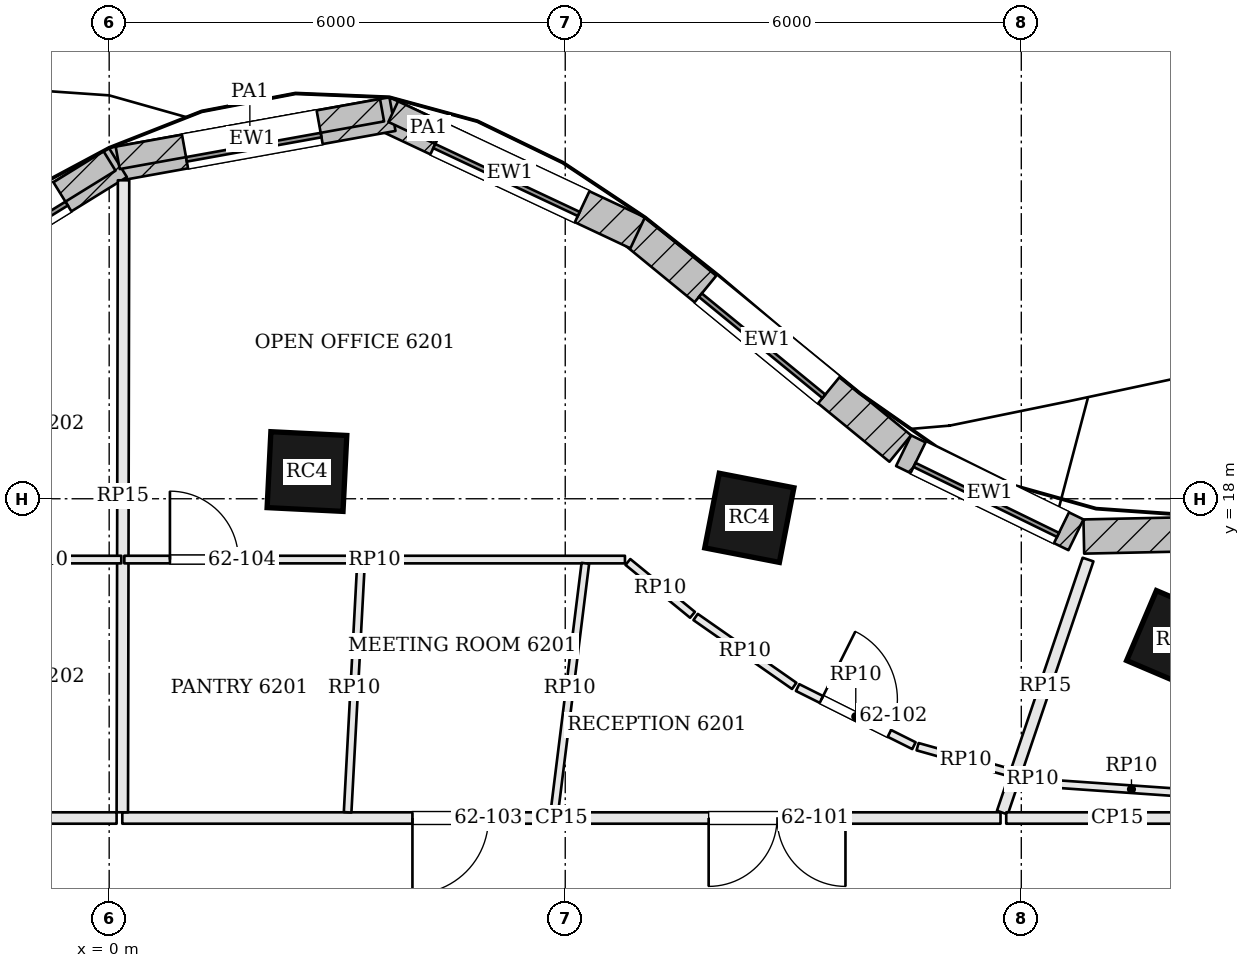
"""IFC4 building model, lengths in metres.
Left out: names, types, materials, properties, quantities, classifications, styles, units other than length and angle.
Written with IfcOpenShell. Run it as: python <this file> out.ifc"""

import sys

from ifc_helpers import new_model, si_unit, direction, frame, frame_2d, origin, origin_2d, place, context, subcontext, project, spatial, rectangle, extrude, element, fill, save


model = new_model("IFC4")
c1 = context("Model", 3, precision=1e-05, world=origin(), true_north=direction((0.0, 1.0)))
c2 = subcontext(c1, "Body", "Model", "MODEL_VIEW")
j1 = project(units=[si_unit("LENGTHUNIT", "METRE"), si_unit("PLANEANGLEUNIT", "RADIAN")], contexts=[c1])
p1 = place(None, origin())
s1 = spatial("IfcSite", under=j1, at=p1, CompositionType="ELEMENT")
p2 = place(p1, origin())
s2 = spatial("IfcBuilding", under=s1, at=p2, CompositionType="ELEMENT")
p3 = place(p2, frame((0.0, 0.0, 252.6)))
s3 = spatial("IfcBuildingStorey", under=s2, at=p3, CompositionType="ELEMENT", Elevation=252.6)
for number, where, z_axis, x_axis in (
    (1, (14.042, 16.136, 0.0), (0.0, 0.0, 1.0), (-0.92, 0.392, 0.0)),
    (2, (8.422, 17.749, 0.0), (0.0, 0.0, 1.0), (-0.982, 0.191, 0.0)),
    (3, (2.602, 18.358, 0.0), (0.0, 0.0, 1.0), (-0.999, 0.05, 0.0)),
):
    element("IfcColumn", number, at=place(p3, frame(where, z_axis=z_axis, x_axis=x_axis)), inside=s3, PredefinedType="COLUMN", context=c2, shape_type="SweptSolid", body=[
        extrude(rectangle(XDim=1.0, YDim=1.0, at=origin_2d()), origin(), (0.0, 0.0, 1.0), 3.9),
    ])
p4 = place(p3, frame((18.434, 17.622, 0.0), z_axis=(0.0, 0.0, 1.0), x_axis=(-0.999773749739, -0.021270856405, 0.0)))
e4 = element("IfcWall", 4, at=p4, inside=s3, PredefinedType="SOLIDWALL", context=c2, shape_type="SweptSolid", body=[
    extrude(rectangle(XDim=5.613, YDim=0.45, at=frame_2d((2.806, 0.0))), origin(), (0.0, 0.0, 1.0), 3.7),
])
p5 = place(p4, frame((1.756, 0.0, 0.9)))
e5 = element("IfcOpeningElement", 5, at=p5, cuts=e4, PredefinedType="OPENING", context=c2, shape_type="SweptSolid", body=[
    extrude(rectangle(XDim=2.1, YDim=2.3, at=frame_2d((1.05, 1.15))), frame((0.0, 0.235, 0.0), z_axis=(0.0, -1.0, 0.0), x_axis=(1.0, 0.0, 0.0)), (0.0, 0.0, 1.0), 0.47),
])
p6 = place(p3, frame((12.719, 17.526, 0.0), z_axis=(0.0, 0.0, 1.0), x_axis=(-0.898643806462, 0.438679050226, 0.0)))
e6 = element("IfcWall", 6, at=p6, inside=s3, PredefinedType="SOLIDWALL", context=c2, shape_type="SweptSolid", body=[
    extrude(rectangle(XDim=2.523, YDim=0.45, at=frame_2d((1.262, 0.0))), origin(), (0.0, 0.0, 1.0), 3.7),
])
p7 = place(p6, frame((0.212, 0.0, 0.9)))
e7 = element("IfcOpeningElement", 7, at=p7, cuts=e6, PredefinedType="OPENING", context=c2, shape_type="SweptSolid", body=[
    extrude(rectangle(XDim=2.1, YDim=2.3, at=frame_2d((1.05, 1.15))), frame((0.0, 0.235, 0.0), z_axis=(0.0, -1.0, 0.0), x_axis=(1.0, 0.0, 0.0)), (0.0, 0.0, 1.0), 0.47),
])
p8 = place(p3, frame((10.407, 18.661, 0.0), z_axis=(0.0, 0.0, 1.0), x_axis=(-0.773702458947, 0.633549133864, 0.0)))
e8 = element("IfcWall", 8, at=p8, inside=s3, PredefinedType="SOLIDWALL", context=c2, shape_type="SweptSolid", body=[
    extrude(rectangle(XDim=4.526, YDim=0.45, at=frame_2d((2.263, 0.0))), origin(), (0.0, 0.0, 1.0), 3.7),
])
p9 = place(p8, frame((1.213, 0.0, 0.9)))
e9 = element("IfcOpeningElement", 9, at=p9, cuts=e8, PredefinedType="OPENING", context=c2, shape_type="SweptSolid", body=[
    extrude(rectangle(XDim=2.1, YDim=2.3, at=frame_2d((1.05, 1.15))), frame((0.0, 0.235, 0.0), z_axis=(0.0, -1.0, 0.0), x_axis=(1.0, 0.0, 0.0)), (0.0, 0.0, 1.0), 0.47),
])
p10 = place(p3, frame((6.953, 21.499, 0.0), z_axis=(0.0, 0.0, 1.0), x_axis=(-0.905034581957, 0.425337989676, 0.0)))
e10 = element("IfcWall", 10, at=p10, inside=s3, PredefinedType="SOLIDWALL", context=c2, shape_type="SweptSolid", body=[
    extrude(rectangle(XDim=3.714, YDim=0.45, at=frame_2d((1.857, 0.0))), origin(), (0.0, 0.0, 1.0), 3.7),
])
p11 = place(p10, frame((0.807, 0.0, 0.9)))
e11 = element("IfcOpeningElement", 11, at=p11, cuts=e10, PredefinedType="OPENING", context=c2, shape_type="SweptSolid", body=[
    extrude(rectangle(XDim=2.1, YDim=2.3, at=frame_2d((1.05, 1.15))), frame((0.0, 0.235, 0.0), z_axis=(0.0, -1.0, 0.0), x_axis=(1.0, 0.0, 0.0)), (0.0, 0.0, 1.0), 0.47),
])
p12 = place(p3, frame((3.727, 23.061, 0.0), z_axis=(0.0, 0.0, 1.0), x_axis=(-0.984119180424, -0.177508982087, 0.0)))
e12 = element("IfcWall", 12, at=p12, inside=s3, PredefinedType="SOLIDWALL", context=c2, shape_type="SweptSolid", body=[
    extrude(rectangle(XDim=3.747, YDim=0.45, at=frame_2d((1.873, 0.0))), origin(), (0.0, 0.0, 1.0), 3.7),
])
p13 = place(p12, frame((0.973, 0.0, 0.9)))
e13 = element("IfcOpeningElement", 13, at=p13, cuts=e12, PredefinedType="OPENING", context=c2, shape_type="SweptSolid", body=[
    extrude(rectangle(XDim=1.8, YDim=2.3, at=frame_2d((0.9, 1.15))), frame((0.0, 0.235, 0.0), z_axis=(0.0, -1.0, 0.0), x_axis=(1.0, 0.0, 0.0)), (0.0, 0.0, 1.0), 0.47),
])
p14 = place(p3, frame((0.115, 22.424, 0.0), z_axis=(0.0, 0.0, 1.0), x_axis=(-0.8506970368, -0.525656305564, 0.0)))
e14 = element("IfcWall", 14, at=p14, inside=s3, PredefinedType="SOLIDWALL", context=c2, shape_type="SweptSolid", body=[
    extrude(rectangle(XDim=3.816, YDim=0.45, at=frame_2d((1.908, 0.0))), origin(), (0.0, 0.0, 1.0), 3.7),
])
p15 = place(p14, frame((0.858, 0.0, 0.9)))
e15 = element("IfcOpeningElement", 15, at=p15, cuts=e14, PredefinedType="OPENING", context=c2, shape_type="SweptSolid", body=[
    extrude(rectangle(XDim=2.1, YDim=2.3, at=frame_2d((1.05, 1.15))), frame((0.0, 0.235, 0.0), z_axis=(0.0, -1.0, 0.0), x_axis=(1.0, 0.0, 0.0)), (0.0, 0.0, 1.0), 0.47),
])
p16 = place(p3, frame((4.667, 22.656, 3.9), z_axis=(0.0, 0.0, 1.0), x_axis=(-0.905050240273, 0.425304670304, 0.0)))
e16 = element("IfcWall", 16, at=p16, inside=s3, PredefinedType="PARAPET", context=c2, shape_type="SweptSolid", body=[
    extrude(rectangle(XDim=1.027, YDim=0.3, at=frame_2d((0.513, 0.0))), origin(), (0.0, 0.0, 1.0), 1.1),
])
p17 = place(p3, frame((3.59, 23.112, 3.9), z_axis=(0.0, 0.0, 1.0), x_axis=(-0.984124248147, -0.177480884064, 0.0)))
e17 = element("IfcWall", 17, at=p17, inside=s3, PredefinedType="PARAPET", context=c2, shape_type="SweptSolid", body=[
    extrude(rectangle(XDim=3.534, YDim=0.3, at=frame_2d((1.767, 0.0))), origin(), (0.0, 0.0, 1.0), 1.1),
])
p18 = place(p3, frame((0.005, 22.444, 3.9), z_axis=(0.0, 0.0, 1.0), x_axis=(-0.850710394144, -0.525634688063, 0.0)))
e18 = element("IfcWall", 18, at=p18, inside=s3, PredefinedType="PARAPET", context=c2, shape_type="SweptSolid", body=[
    extrude(rectangle(XDim=3.702, YDim=0.3, at=frame_2d((1.851, 0.0))), origin(), (0.0, 0.0, 1.0), 1.1),
])
p19 = place(p3, frame((11.727, 13.8, 0.0), z_axis=(0.0, 0.0, 1.0), x_axis=(-1.0, 0.0, 0.0)))
e19 = element("IfcWall", 19, at=p19, inside=s3, PredefinedType="PARTITIONING", context=c2, shape_type="SweptSolid", body=[
    extrude(rectangle(XDim=11.554, YDim=0.15, at=frame_2d((5.777, 0.0))), origin(), (0.0, 0.0, 1.0), 3.084),
])
p20 = place(p19, frame((2.04, 0.0, 0.0)))
e20 = element("IfcOpeningElement", 20, at=p20, cuts=e19, PredefinedType="OPENING", context=c2, shape_type="SweptSolid", body=[
    extrude(rectangle(XDim=1.8, YDim=2.1, at=frame_2d((0.9, 1.05))), frame((0.0, 0.085, 0.0), z_axis=(0.0, -1.0, 0.0), x_axis=(1.0, 0.0, 0.0)), (0.0, 0.0, 1.0), 0.17),
])
p21 = place(p19, frame((6.737, 0.0, 0.0)))
e21 = element("IfcOpeningElement", 21, at=p21, cuts=e19, PredefinedType="OPENING", context=c2, shape_type="SweptSolid", body=[
    extrude(rectangle(XDim=1.0, YDim=2.4, at=frame_2d((0.5, 1.2))), frame((0.0, 0.085, 0.0), z_axis=(0.0, -1.0, 0.0), x_axis=(1.0, 0.0, 0.0)), (0.0, 0.0, 1.0), 0.17),
])
p22 = place(p3, frame((12.878, 17.2, 0.0), z_axis=(0.0, 0.0, 1.0), x_axis=(-0.320642197559, -0.947200391229, 0.0)))
e22 = element("IfcWall", 22, at=p22, inside=s3, PredefinedType="PARTITIONING", context=c2, shape_type="SweptSolid", body=[
    extrude(rectangle(XDim=3.515, YDim=0.15, at=frame_2d((1.757, 0.0))), origin(), (0.0, 0.0, 1.0), 3.084),
])
p23 = place(p3, frame((0.189, 22.19, 0.0), z_axis=(0.0, 0.0, 1.0), x_axis=(-0.001967286324, -0.99999806489, 0.0)))
e23 = element("IfcWall", 23, at=p23, inside=s3, PredefinedType="PARTITIONING", context=c2, shape_type="SweptSolid", body=[
    extrude(rectangle(XDim=8.315, YDim=0.15, at=frame_2d((4.157, 0.0))), origin(), (0.0, 0.0, 1.0), 3.084),
])
p24 = place(p3, frame((0.098, 13.8, 0.0), z_axis=(0.0, 0.0, 1.0), x_axis=(-1.0, 0.0, 0.0)))
e24 = element("IfcWall", 24, at=p24, inside=s3, PredefinedType="PARTITIONING", context=c2, shape_type="SweptSolid", body=[
    extrude(rectangle(XDim=12.609, YDim=0.15, at=frame_2d((6.304, 0.0))), origin(), (0.0, 0.0, 1.0), 3.084),
])
p25 = place(p24, frame((3.548, 0.0, 0.0)))
e25 = element("IfcOpeningElement", 25, at=p25, cuts=e24, PredefinedType="OPENING", context=c2, shape_type="SweptSolid", body=[
    extrude(rectangle(XDim=1.8, YDim=2.1, at=frame_2d((0.9, 1.05))), frame((0.0, 0.085, 0.0), z_axis=(0.0, -1.0, 0.0), x_axis=(1.0, 0.0, 0.0)), (0.0, 0.0, 1.0), 0.17),
])
p26 = place(p3, frame((14.725, 13.8, 0.0), z_axis=(0.0, 0.0, 1.0), x_axis=(-1.0, 0.0, 0.0)))
e26 = element("IfcWall", 26, at=p26, inside=s3, PredefinedType="PARTITIONING", context=c2, shape_type="SweptSolid", body=[
    extrude(rectangle(XDim=2.923, YDim=0.15, at=frame_2d((1.462, 0.0))), origin(), (0.0, 0.0, 1.0), 3.084),
])
p27 = place(p3, frame((0.199, 17.2, 0.0), z_axis=(0.0, 0.0, 1.0), x_axis=(1.0, 0.0, 0.0)))
e27 = element("IfcWall", 27, at=p27, inside=s3, PredefinedType="PARTITIONING", context=c2, shape_type="SweptSolid", body=[
    extrude(rectangle(XDim=6.586, YDim=0.1, at=frame_2d((3.293, 0.0))), origin(), (0.0, 0.0, 1.0), 3.084),
])
p28 = place(p27, frame((0.6, 0.0, 0.0)))
e28 = element("IfcOpeningElement", 28, at=p28, cuts=e27, PredefinedType="OPENING", context=c2, shape_type="SweptSolid", body=[
    extrude(rectangle(XDim=0.9, YDim=2.1, at=frame_2d((0.45, 1.05))), frame((0.0, 0.06, 0.0), z_axis=(0.0, -1.0, 0.0), x_axis=(1.0, 0.0, 0.0)), (0.0, 0.0, 1.0), 0.12),
])
p29 = place(p3, frame((6.824, 17.168, 0.0), z_axis=(0.0, 0.0, 1.0), x_axis=(0.774165282359, -0.632983503411, 0.0)))
e29 = element("IfcWall", 29, at=p29, inside=s3, PredefinedType="PARTITIONING", context=c2, shape_type="SweptSolid", body=[
    extrude(rectangle(XDim=1.098, YDim=0.1, at=frame_2d((0.549, 0.0))), origin(), (0.0, 0.0, 1.0), 3.084),
])
p30 = place(p3, frame((7.715, 16.445, 0.0), z_axis=(0.0, 0.0, 1.0), x_axis=(0.819746237961, -0.572726902938, 0.0)))
e30 = element("IfcWall", 30, at=p30, inside=s3, PredefinedType="PARTITIONING", context=c2, shape_type="SweptSolid", body=[
    extrude(rectangle(XDim=1.582, YDim=0.1, at=frame_2d((0.791, 0.0))), origin(), (0.0, 0.0, 1.0), 3.084),
])
p31 = place(p3, frame((9.057, 15.516, 0.0), z_axis=(0.0, 0.0, 1.0), x_axis=(0.894598395044, -0.446871023434, 0.0)))
e31 = element("IfcWall", 31, at=p31, inside=s3, PredefinedType="PARTITIONING", context=c2, shape_type="SweptSolid", body=[
    extrude(rectangle(XDim=1.71, YDim=0.1, at=frame_2d((0.855, 0.0))), origin(), (0.0, 0.0, 1.0), 3.084),
])
p32 = place(p31, frame((0.35, 0.0, 0.0)))
e32 = element("IfcOpeningElement", 32, at=p32, cuts=e31, PredefinedType="OPENING", context=c2, shape_type="SweptSolid", body=[
    extrude(rectangle(XDim=1.0, YDim=2.1, at=frame_2d((0.5, 1.05))), frame((0.0, 0.06, 0.0), z_axis=(0.0, -1.0, 0.0), x_axis=(1.0, 0.0, 0.0)), (0.0, 0.0, 1.0), 0.12),
])
p33 = place(p3, frame((10.635, 14.738, 0.0), z_axis=(0.0, 0.0, 1.0), x_axis=(0.962794316294, -0.270235276217, 0.0)))
e33 = element("IfcWall", 33, at=p33, inside=s3, PredefinedType="PARTITIONING", context=c2, shape_type="SweptSolid", body=[
    extrude(rectangle(XDim=1.316, YDim=0.1, at=frame_2d((0.658, 0.0))), origin(), (0.0, 0.0, 1.0), 3.084),
])
p34 = place(p3, frame((5.857, 13.875, 0.0), z_axis=(0.0, 0.0, 1.0), x_axis=(0.123579610883, 0.992334661177, 0.0)))
e34 = element("IfcWall", 34, at=p34, inside=s3, PredefinedType="PARTITIONING", context=c2, shape_type="SweptSolid", body=[
    extrude(rectangle(XDim=3.301, YDim=0.1, at=frame_2d((1.651, 0.0))), origin(), (0.0, 0.0, 1.0), 3.084),
])
p35 = place(p3, frame((3.137, 13.875, 0.0), z_axis=(0.0, 0.0, 1.0), x_axis=(0.053594127278, 0.998562801992, 0.0)))
e35 = element("IfcWall", 35, at=p35, inside=s3, PredefinedType="PARTITIONING", context=c2, shape_type="SweptSolid", body=[
    extrude(rectangle(XDim=3.28, YDim=0.1, at=frame_2d((1.64, 0.0))), origin(), (0.0, 0.0, 1.0), 3.084),
])
p36 = place(p3, frame((-1.93, 17.2, 0.0), z_axis=(0.0, 0.0, 1.0), x_axis=(1.0, 0.0, 0.0)))
e36 = element("IfcWall", 36, at=p36, inside=s3, PredefinedType="PARTITIONING", context=c2, shape_type="SweptSolid", body=[
    extrude(rectangle(XDim=2.09, YDim=0.1, at=frame_2d((1.045, 0.0))), origin(), (0.0, 0.0, 1.0), 3.084),
])
p37 = place(p3, frame((11.941, 14.372, 0.0), z_axis=(0.0, 0.0, 1.0), x_axis=(0.962770354452, -0.270320632932, 0.0)))
e37 = element("IfcWall", 37, at=p37, inside=s3, PredefinedType="PARTITIONING", context=c2, shape_type="SweptSolid", body=[
    extrude(rectangle(XDim=0.433, YDim=0.1, at=frame_2d((0.216, 0.0))), origin(), (0.0, 0.0, 1.0), 3.084),
])
p38 = place(p3, frame((12.408, 14.251, 0.0), z_axis=(0.0, 0.0, 1.0), x_axis=(0.997594502721, -0.069319608638, 0.0)))
e38 = element("IfcWall", 38, at=p38, inside=s3, PredefinedType="PARTITIONING", context=c2, shape_type="SweptSolid", body=[
    extrude(rectangle(XDim=2.089, YDim=0.1, at=frame_2d((1.044, 0.0))), origin(), (0.0, 0.0, 1.0), 3.084),
])
p39 = place(p7, origin())
e39 = element("IfcWindow", 39, at=p39, inside=s3, PartitioningType="SINGLE_PANEL", PredefinedType="WINDOW", context=c2, shape_type="SweptSolid", body=[
    extrude(rectangle(XDim=2.1, YDim=2.3, at=frame_2d((1.05, 1.15))), frame((0.0, 0.135, 0.0), z_axis=(0.0, -1.0, 0.0), x_axis=(1.0, 0.0, 0.0)), (0.0, 0.0, 1.0), 0.06),
])
fill(e7, e39)
p40 = place(p9, origin())
e40 = element("IfcWindow", 40, at=p40, inside=s3, PartitioningType="SINGLE_PANEL", PredefinedType="WINDOW", context=c2, shape_type="SweptSolid", body=[
    extrude(rectangle(XDim=2.1, YDim=2.3, at=frame_2d((1.05, 1.15))), frame((0.0, 0.135, 0.0), z_axis=(0.0, -1.0, 0.0), x_axis=(1.0, 0.0, 0.0)), (0.0, 0.0, 1.0), 0.06),
])
fill(e9, e40)
p41 = place(p11, origin())
e41 = element("IfcWindow", 41, at=p41, inside=s3, PartitioningType="SINGLE_PANEL", PredefinedType="WINDOW", context=c2, shape_type="SweptSolid", body=[
    extrude(rectangle(XDim=2.1, YDim=2.3, at=frame_2d((1.05, 1.15))), frame((0.0, 0.135, 0.0), z_axis=(0.0, -1.0, 0.0), x_axis=(1.0, 0.0, 0.0)), (0.0, 0.0, 1.0), 0.06),
])
fill(e11, e41)
p42 = place(p13, origin())
e42 = element("IfcWindow", 42, at=p42, inside=s3, PartitioningType="SINGLE_PANEL", PredefinedType="WINDOW", context=c2, shape_type="SweptSolid", body=[
    extrude(rectangle(XDim=1.8, YDim=2.3, at=frame_2d((0.9, 1.15))), frame((0.0, 0.135, 0.0), z_axis=(0.0, -1.0, 0.0), x_axis=(1.0, 0.0, 0.0)), (0.0, 0.0, 1.0), 0.06),
])
fill(e13, e42)
p43 = place(p15, origin())
e43 = element("IfcWindow", 43, at=p43, inside=s3, PartitioningType="SINGLE_PANEL", PredefinedType="WINDOW", context=c2, shape_type="SweptSolid", body=[
    extrude(rectangle(XDim=2.1, YDim=2.3, at=frame_2d((1.05, 1.15))), frame((0.0, 0.135, 0.0), z_axis=(0.0, -1.0, 0.0), x_axis=(1.0, 0.0, 0.0)), (0.0, 0.0, 1.0), 0.06),
])
fill(e15, e43)
p44 = place(p20, origin())
e44 = element("IfcDoor", 44, at=p44, inside=s3, OperationType="DOUBLE_DOOR_SINGLE_SWING", PredefinedType="DOOR", context=c2, shape_type="SweptSolid", body=[
    extrude(rectangle(XDim=1.8, YDim=2.1, at=frame_2d((0.9, 1.05))), frame((0.0, 0.025, 0.0), z_axis=(0.0, -1.0, 0.0), x_axis=(1.0, 0.0, 0.0)), (0.0, 0.0, 1.0), 0.05),
])
fill(e20, e44)
p45 = place(p32, origin())
e45 = element("IfcDoor", 45, at=p45, inside=s3, OperationType="SINGLE_SWING_LEFT", PredefinedType="DOOR", context=c2, shape_type="SweptSolid", body=[
    extrude(rectangle(XDim=1.0, YDim=2.1, at=frame_2d((0.5, 1.05))), frame((0.0, 0.025, 0.0), z_axis=(0.0, -1.0, 0.0), x_axis=(1.0, 0.0, 0.0)), (0.0, 0.0, 1.0), 0.05),
])
fill(e32, e45)
p46 = place(p21, origin())
e46 = element("IfcDoor", 46, at=p46, inside=s3, OperationType="SINGLE_SWING_RIGHT", PredefinedType="DOOR", context=c2, shape_type="SweptSolid", body=[
    extrude(rectangle(XDim=1.0, YDim=2.4, at=frame_2d((0.5, 1.2))), frame((0.0, 0.025, 0.0), z_axis=(0.0, -1.0, 0.0), x_axis=(1.0, 0.0, 0.0)), (0.0, 0.0, 1.0), 0.05),
])
fill(e21, e46)
p47 = place(p28, origin())
e47 = element("IfcDoor", 47, at=p47, inside=s3, OperationType="SINGLE_SWING_LEFT", PredefinedType="DOOR", context=c2, shape_type="SweptSolid", body=[
    extrude(rectangle(XDim=0.9, YDim=2.1, at=frame_2d((0.45, 1.05))), frame((0.0, 0.025, 0.0), z_axis=(0.0, -1.0, 0.0), x_axis=(1.0, 0.0, 0.0)), (0.0, 0.0, 1.0), 0.05),
])
fill(e28, e47)
save(model, sys.argv[1])
